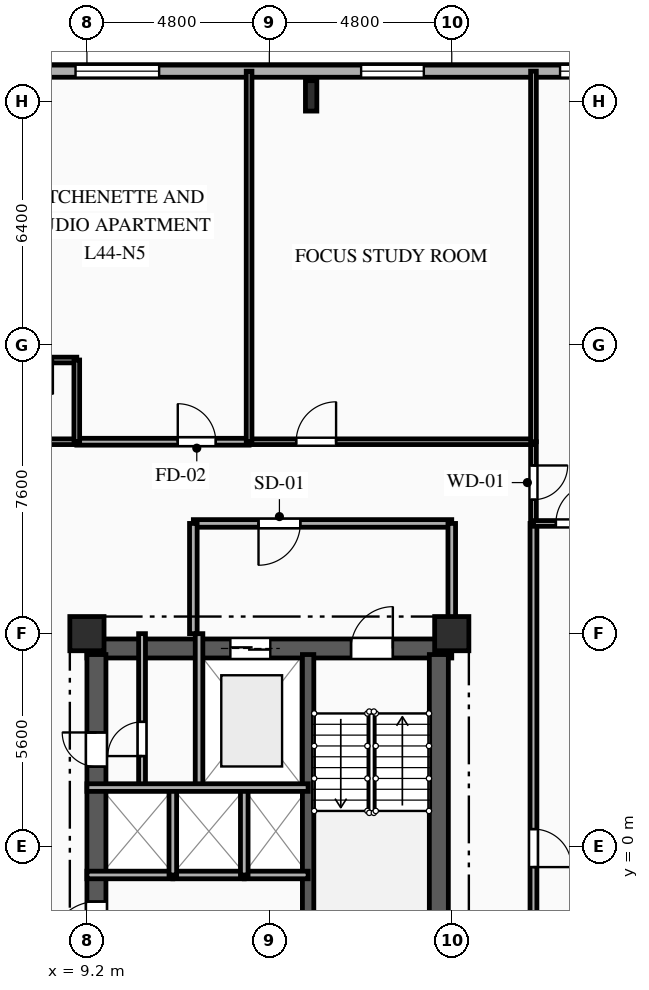
"""IFC4 building model, lengths in metres.
Left out: names, types, materials, properties, quantities, classifications, styles, units other than length and angle.
Written with IfcOpenShell. Run it as: python <this file> out.ifc"""

import sys

from ifc_helpers import new_model, si_unit, direction, frame, frame_2d, origin, origin_2d, place, context, subcontext, project, spatial, rectangle, i_section, extrude, element, fill, save


model = new_model("IFC4")
c1 = context("Model", 3, precision=1e-05, world=origin(), true_north=direction((0.0, 1.0)))
c2 = subcontext(c1, "Body", "Model", "MODEL_VIEW")
j1 = project(units=[si_unit("LENGTHUNIT", "METRE"), si_unit("PLANEANGLEUNIT", "RADIAN")], contexts=[c1])
p1 = place(None, origin())
s1 = spatial("IfcSite", under=j1, at=p1, CompositionType="ELEMENT")
p2 = place(p1, origin())
s2 = spatial("IfcBuilding", under=s1, at=p2, CompositionType="ELEMENT")
p3 = place(p2, frame((0.0, 0.0, 157.8)))
s3 = spatial("IfcBuildingStorey", under=s2, at=p3, CompositionType="ELEMENT", Elevation=157.8)
for number, where, z_axis, x_axis in (
    (1, (9.2, 5.6, 0.0), (0.0, 0.0, 1.0), (1.0, 0.0, 0.0)),
    (2, (18.8, 5.6, 0.0), (0.0, 0.0, 1.0), (1.0, 0.0, 0.0)),
):
    element("IfcColumn", number, at=place(p3, frame(where, z_axis=z_axis, x_axis=x_axis)), inside=s3, PredefinedType="COLUMN", context=c2, shape_type="SweptSolid", body=[
        extrude(rectangle(XDim=0.9, YDim=0.9, at=origin_2d()), origin(), (0.0, 0.0, 1.0), 3.35),
    ])
p4 = place(p3, frame((15.1, 19.75, 0.0), z_axis=(0.0, 0.0, 1.0), x_axis=(1.0, 0.0, 0.0)))
e3 = element("IfcColumn", 3, at=p4, inside=s3, PredefinedType="COLUMN", context=c2, shape_type="SweptSolid", body=[
    extrude(i_section(OverallWidth=0.3, OverallDepth=0.8, WebThickness=0.018, FlangeThickness=0.033, FilletRadius=0.03, at=origin_2d()), origin(), (0.0, 0.0, 1.0), 3.35),
])
p5 = place(p3, frame((-25.8, 20.4, 0.0), z_axis=(0.0, 0.0, 1.0), x_axis=(1.0, 0.0, 0.0)))
e4 = element("IfcWall", 4, at=p5, inside=s3, PredefinedType="SOLIDWALL", context=c2, shape_type="SweptSolid", body=[
    extrude(rectangle(XDim=49.6, YDim=0.32, at=frame_2d((24.8, 0.0))), origin(), (0.0, 0.0, 1.0), 3.04),
])
p6 = place(p5, frame((2.135, 0.0, 0.85)))
e5 = element("IfcOpeningElement", 5, at=p6, cuts=e4, PredefinedType="OPENING", context=c2, shape_type="SweptSolid", body=[
    extrude(rectangle(XDim=1.65, YDim=1.85, at=frame_2d((0.825, 0.925))), frame((0.0, 0.17, 0.0), z_axis=(0.0, -1.0, 0.0), x_axis=(1.0, 0.0, 0.0)), (0.0, 0.0, 1.0), 0.34),
])
p7 = place(p5, frame((6.706, 0.0, 0.85)))
e6 = element("IfcOpeningElement", 6, at=p7, cuts=e4, PredefinedType="OPENING", context=c2, shape_type="SweptSolid", body=[
    extrude(rectangle(XDim=1.65, YDim=1.85, at=frame_2d((0.825, 0.925))), frame((0.0, 0.17, 0.0), z_axis=(0.0, -1.0, 0.0), x_axis=(1.0, 0.0, 0.0)), (0.0, 0.0, 1.0), 0.34),
])
p8 = place(p5, frame((14.966, 0.0, 0.85)))
e7 = element("IfcOpeningElement", 7, at=p8, cuts=e4, PredefinedType="OPENING", context=c2, shape_type="SweptSolid", body=[
    extrude(rectangle(XDim=1.5, YDim=1.85, at=frame_2d((0.75, 0.925))), frame((0.0, 0.17, 0.0), z_axis=(0.0, -1.0, 0.0), x_axis=(1.0, 0.0, 0.0)), (0.0, 0.0, 1.0), 0.34),
])
p9 = place(p5, frame((20.74, 0.0, 0.85)))
e8 = element("IfcOpeningElement", 8, at=p9, cuts=e4, PredefinedType="OPENING", context=c2, shape_type="SweptSolid", body=[
    extrude(rectangle(XDim=2.2, YDim=1.85, at=frame_2d((1.1, 0.925))), frame((0.0, 0.17, 0.0), z_axis=(0.0, -1.0, 0.0), x_axis=(1.0, 0.0, 0.0)), (0.0, 0.0, 1.0), 0.34),
])
p10 = place(p5, frame((27.74, 0.0, 0.85)))
e9 = element("IfcOpeningElement", 9, at=p10, cuts=e4, PredefinedType="OPENING", context=c2, shape_type="SweptSolid", body=[
    extrude(rectangle(XDim=2.2, YDim=1.85, at=frame_2d((1.1, 0.925))), frame((0.0, 0.17, 0.0), z_axis=(0.0, -1.0, 0.0), x_axis=(1.0, 0.0, 0.0)), (0.0, 0.0, 1.0), 0.34),
])
p11 = place(p5, frame((34.7, 0.0, 0.85)))
e10 = element("IfcOpeningElement", 10, at=p11, cuts=e4, PredefinedType="OPENING", context=c2, shape_type="SweptSolid", body=[
    extrude(rectangle(XDim=2.2, YDim=1.85, at=frame_2d((1.1, 0.925))), frame((0.0, 0.17, 0.0), z_axis=(0.0, -1.0, 0.0), x_axis=(1.0, 0.0, 0.0)), (0.0, 0.0, 1.0), 0.34),
])
p12 = place(p5, frame((42.215, 0.0, 0.85)))
e11 = element("IfcOpeningElement", 11, at=p12, cuts=e4, PredefinedType="OPENING", context=c2, shape_type="SweptSolid", body=[
    extrude(rectangle(XDim=1.65, YDim=1.85, at=frame_2d((0.825, 0.925))), frame((0.0, 0.17, 0.0), z_axis=(0.0, -1.0, 0.0), x_axis=(1.0, 0.0, 0.0)), (0.0, 0.0, 1.0), 0.34),
])
p13 = place(p5, frame((47.45, 0.0, 0.85)))
e12 = element("IfcOpeningElement", 12, at=p13, cuts=e4, PredefinedType="OPENING", context=c2, shape_type="SweptSolid", body=[
    extrude(rectangle(XDim=1.1, YDim=1.85, at=frame_2d((0.55, 0.925))), frame((0.0, 0.17, 0.0), z_axis=(0.0, -1.0, 0.0), x_axis=(1.0, 0.0, 0.0)), (0.0, 0.0, 1.0), 0.34),
])
p14 = place(p3, frame((9.2, 5.21, 0.0), z_axis=(0.0, 0.0, 1.0), x_axis=(1.0, 0.0, 0.0)))
e13 = element("IfcWall", 13, at=p14, inside=s3, PredefinedType="SHEAR", context=c2, shape_type="SweptSolid", body=[
    extrude(rectangle(XDim=9.6, YDim=0.5, at=frame_2d((4.8, 0.0))), origin(), (0.0, 0.0, 1.0), 3.04),
])
p15 = place(p14, frame((6.95, 0.0, 0.0)))
e14 = element("IfcOpeningElement", 14, at=p15, cuts=e13, PredefinedType="OPENING", context=c2, shape_type="SweptSolid", body=[
    extrude(rectangle(XDim=1.1, YDim=2.15, at=frame_2d((0.55, 1.075))), frame((0.0, 0.26, 0.0), z_axis=(0.0, -1.0, 0.0), x_axis=(1.0, 0.0, 0.0)), (0.0, 0.0, 1.0), 0.52),
])
p16 = place(p14, frame((3.775, 0.0, 0.0)))
e15 = element("IfcOpeningElement", 15, at=p16, cuts=e13, PredefinedType="OPENING", context=c2, shape_type="SweptSolid", body=[
    extrude(rectangle(XDim=1.05, YDim=2.1, at=frame_2d((0.525, 1.05))), frame((0.0, 0.26, 0.0), z_axis=(0.0, -1.0, 0.0), x_axis=(1.0, 0.0, 0.0)), (0.0, 0.0, 1.0), 0.52),
])
p17 = place(p3, frame((9.45, -5.05, 0.0), z_axis=(0.0, 0.0, 1.0), x_axis=(0.0, 1.0, 0.0)))
e16 = element("IfcWall", 16, at=p17, inside=s3, PredefinedType="SHEAR", context=c2, shape_type="SweptSolid", body=[
    extrude(rectangle(XDim=10.1, YDim=0.5, at=frame_2d((5.05, 0.0))), origin(), (0.0, 0.0, 1.0), 3.04),
])
p18 = place(p17, frame((7.15, 0.0, 0.0)))
e17 = element("IfcOpeningElement", 17, at=p18, cuts=e16, PredefinedType="OPENING", context=c2, shape_type="SweptSolid", body=[
    extrude(rectangle(XDim=0.9, YDim=2.1, at=frame_2d((0.45, 1.05))), frame((0.0, 0.26, 0.0), z_axis=(0.0, -1.0, 0.0), x_axis=(1.0, 0.0, 0.0)), (0.0, 0.0, 1.0), 0.52),
])
p19 = place(p17, frame((2.4, 0.0, 0.0)))
e18 = element("IfcOpeningElement", 18, at=p19, cuts=e16, PredefinedType="OPENING", context=c2, shape_type="SweptSolid", body=[
    extrude(rectangle(XDim=1.2, YDim=2.15, at=frame_2d((0.6, 1.075))), frame((0.0, 0.26, 0.0), z_axis=(0.0, -1.0, 0.0), x_axis=(1.0, 0.0, 0.0)), (0.0, 0.0, 1.0), 0.52),
])
p20 = place(p3, frame((18.46, -5.05, 0.0), z_axis=(0.0, 0.0, 1.0), x_axis=(0.0, 1.0, 0.0)))
e19 = element("IfcWall", 19, at=p20, inside=s3, PredefinedType="SHEAR", context=c2, shape_type="SweptSolid", body=[
    extrude(rectangle(XDim=10.1, YDim=0.5, at=frame_2d((5.05, 0.0))), origin(), (0.0, 0.0, 1.0), 3.04),
])
p21 = place(p3, frame((15.02, -5.05, 0.0), z_axis=(0.0, 0.0, 1.0), x_axis=(0.0, 1.0, 0.0)))
e20 = element("IfcWall", 20, at=p21, inside=s3, PredefinedType="SHEAR", context=c2, shape_type="SweptSolid", body=[
    extrude(rectangle(XDim=10.1, YDim=0.3, at=frame_2d((5.05, 0.0))), origin(), (0.0, 0.0, 1.0), 3.04),
])
p22 = place(p3, frame((12.15, 5.6, 0.0), z_axis=(0.0, 0.0, 1.0), x_axis=(0.0, -1.0, 0.0)))
e21 = element("IfcWall", 21, at=p22, inside=s3, PredefinedType="PARTITIONING", context=c2, shape_type="SweptSolid", body=[
    extrude(rectangle(XDim=4.05, YDim=0.2, at=frame_2d((2.025, 0.0))), origin(), (0.0, 0.0, 1.0), 3.04),
])
p23 = place(p3, frame((18.8, 8.5, 0.0), z_axis=(0.0, 0.0, 1.0), x_axis=(-1.0, 0.0, 0.0)))
e22 = element("IfcWall", 22, at=p23, inside=s3, PredefinedType="PARTITIONING", context=c2, shape_type="SweptSolid", body=[
    extrude(rectangle(XDim=6.8, YDim=0.2, at=frame_2d((3.4, 0.0))), origin(), (0.0, 0.0, 1.0), 3.04),
])
p24 = place(p23, frame((3.985, 0.0, 0.0)))
e23 = element("IfcOpeningElement", 23, at=p24, cuts=e22, PredefinedType="OPENING", context=c2, shape_type="SweptSolid", body=[
    extrude(rectangle(XDim=1.1, YDim=2.15, at=frame_2d((0.55, 1.075))), frame((0.0, 0.11, 0.0), z_axis=(0.0, -1.0, 0.0), x_axis=(1.0, 0.0, 0.0)), (0.0, 0.0, 1.0), 0.22),
])
p25 = place(p3, frame((18.8, 5.6, 0.0), z_axis=(0.0, 0.0, 1.0), x_axis=(0.0, 1.0, 0.0)))
e24 = element("IfcWall", 24, at=p25, inside=s3, PredefinedType="PARTITIONING", context=c2, shape_type="SweptSolid", body=[
    extrude(rectangle(XDim=2.9, YDim=0.2, at=frame_2d((1.45, 0.0))), origin(), (0.0, 0.0, 1.0), 2.525),
])
p26 = place(p3, frame((12.0, 8.5, 0.0), z_axis=(0.0, 0.0, 1.0), x_axis=(0.0, -1.0, 0.0)))
e25 = element("IfcWall", 25, at=p26, inside=s3, PredefinedType="PARTITIONING", context=c2, shape_type="SweptSolid", body=[
    extrude(rectangle(XDim=2.9, YDim=0.2, at=frame_2d((1.45, 0.0))), origin(), (0.0, 0.0, 1.0), 3.04),
])
p27 = place(p3, frame((10.65, 1.55, 0.0), z_axis=(0.0, 0.0, 1.0), x_axis=(0.0, 1.0, 0.0)))
e26 = element("IfcWall", 26, at=p27, inside=s3, PredefinedType="PARTITIONING", context=c2, shape_type="SweptSolid", body=[
    extrude(rectangle(XDim=4.05, YDim=0.18, at=frame_2d((2.025, 0.0))), origin(), (0.0, 0.0, 1.0), 3.04),
])
p28 = place(p27, frame((0.829, 0.0, 0.0)))
e27 = element("IfcOpeningElement", 27, at=p28, cuts=e26, PredefinedType="OPENING", context=c2, shape_type="SweptSolid", body=[
    extrude(rectangle(XDim=0.9, YDim=2.1, at=frame_2d((0.45, 1.05))), frame((0.0, 0.1, 0.0), z_axis=(0.0, -1.0, 0.0), x_axis=(1.0, 0.0, 0.0)), (0.0, 0.0, 1.0), 0.2),
])
p29 = place(p3, frame((11.46, -0.75, 0.0), z_axis=(0.0, 0.0, 1.0), x_axis=(-1.0, 0.0, 0.0)))
e28 = element("IfcWall", 28, at=p29, inside=s3, PredefinedType="PARTITIONING", context=c2, shape_type="SweptSolid", body=[
    extrude(rectangle(XDim=2.26, YDim=0.2, at=frame_2d((1.13, 0.0))), origin(), (0.0, 0.0, 1.0), 3.04),
])
p30 = place(p3, frame((13.34, -0.75, 0.0), z_axis=(0.0, 0.0, 1.0), x_axis=(-1.0, 0.0, 0.0)))
e29 = element("IfcWall", 29, at=p30, inside=s3, PredefinedType="PARTITIONING", context=c2, shape_type="SweptSolid", body=[
    extrude(rectangle(XDim=1.88, YDim=0.2, at=frame_2d((0.94, 0.0))), origin(), (0.0, 0.0, 1.0), 3.04),
])
p31 = place(p3, frame((15.02, -0.75, 0.0), z_axis=(0.0, 0.0, 1.0), x_axis=(-1.0, 0.0, 0.0)))
e30 = element("IfcWall", 30, at=p31, inside=s3, PredefinedType="PARTITIONING", context=c2, shape_type="SweptSolid", body=[
    extrude(rectangle(XDim=1.68, YDim=0.2, at=frame_2d((0.84, 0.0))), origin(), (0.0, 0.0, 1.0), 3.04),
])
for number, where, z_axis, x_axis in (
    (31, (11.46, -0.75, 0.0), (0.0, 0.0, 1.0), (0.0, 1.0, 0.0)),
    (32, (13.34, -0.75, 0.0), (0.0, 0.0, 1.0), (0.0, 1.0, 0.0)),
):
    element("IfcWall", number, at=place(p3, frame(where, z_axis=z_axis, x_axis=x_axis)), inside=s3, PredefinedType="PARTITIONING", context=c2, shape_type="SweptSolid", body=[
        extrude(rectangle(XDim=2.3, YDim=0.2, at=frame_2d((1.15, 0.0))), origin(), (0.0, 0.0, 1.0), 3.04),
    ])
p32 = place(p3, frame((20.95, 10.65, 0.0), z_axis=(0.0, 0.0, 1.0), x_axis=(0.0, -1.0, 0.0)))
e33 = element("IfcWall", 33, at=p32, inside=s3, PredefinedType="PARTITIONING", context=c2, shape_type="SweptSolid", body=[
    extrude(rectangle(XDim=2.15, YDim=0.15, at=frame_2d((1.075, 0.0))), origin(), (0.0, 0.0, 1.0), 3.04),
])
p33 = place(p32, frame((0.625, 0.0, 0.0)))
e34 = element("IfcOpeningElement", 34, at=p33, cuts=e33, PredefinedType="OPENING", context=c2, shape_type="SweptSolid", body=[
    extrude(rectangle(XDim=0.9, YDim=2.1, at=frame_2d((0.45, 1.05))), frame((0.0, 0.085, 0.0), z_axis=(0.0, -1.0, 0.0), x_axis=(1.0, 0.0, 0.0)), (0.0, 0.0, 1.0), 0.17),
])
p34 = place(p3, frame((8.933, 10.65, 0.0), z_axis=(0.0, 0.0, 1.0), x_axis=(1.0, 0.0, 0.0)))
e35 = element("IfcWall", 35, at=p34, inside=s3, PredefinedType="PARTITIONING", context=c2, shape_type="SweptSolid", body=[
    extrude(rectangle(XDim=4.534, YDim=0.18, at=frame_2d((2.267, 0.0))), origin(), (0.0, 0.0, 1.0), 3.04),
])
p35 = place(p34, frame((2.657, 0.0, 0.0)))
e36 = element("IfcOpeningElement", 36, at=p35, cuts=e35, PredefinedType="OPENING", context=c2, shape_type="SweptSolid", body=[
    extrude(rectangle(XDim=1.0, YDim=2.15, at=frame_2d((0.5, 1.075))), frame((0.0, 0.1, 0.0), z_axis=(0.0, -1.0, 0.0), x_axis=(1.0, 0.0, 0.0)), (0.0, 0.0, 1.0), 0.2),
])
p36 = place(p3, frame((6.483, 10.65, 0.0), z_axis=(0.0, 0.0, 1.0), x_axis=(1.0, 0.0, 0.0)))
e37 = element("IfcWall", 37, at=p36, inside=s3, PredefinedType="PLUMBINGWALL", context=c2, shape_type="SweptSolid", body=[
    extrude(rectangle(XDim=2.45, YDim=0.15, at=frame_2d((1.225, 0.0))), origin(), (0.0, 0.0, 1.0), 3.04),
])
p37 = place(p3, frame((13.467, 10.65, 0.0), z_axis=(0.0, 0.0, 1.0), x_axis=(1.0, 0.0, 0.0)))
e38 = element("IfcWall", 38, at=p37, inside=s3, PredefinedType="PARTITIONING", context=c2, shape_type="SweptSolid", body=[
    extrude(rectangle(XDim=7.483, YDim=0.15, at=frame_2d((3.741, 0.0))), origin(), (0.0, 0.0, 1.0), 3.04),
])
p38 = place(p37, frame((1.239, 0.0, 0.0)))
e39 = element("IfcOpeningElement", 39, at=p38, cuts=e38, PredefinedType="OPENING", context=c2, shape_type="SweptSolid", body=[
    extrude(rectangle(XDim=1.05, YDim=2.15, at=frame_2d((0.525, 1.075))), frame((0.0, 0.085, 0.0), z_axis=(0.0, -1.0, 0.0), x_axis=(1.0, 0.0, 0.0)), (0.0, 0.0, 1.0), 0.17),
])
p39 = place(p3, frame((20.95, 8.5, 0.0), z_axis=(0.0, 0.0, 1.0), x_axis=(0.0, -1.0, 0.0)))
e40 = element("IfcWall", 40, at=p39, inside=s3, PredefinedType="PARTITIONING", context=c2, shape_type="SweptSolid", body=[
    extrude(rectangle(XDim=14.1, YDim=0.18, at=frame_2d((7.05, 0.0))), origin(), (0.0, 0.0, 1.0), 3.04),
])
p40 = place(p39, frame((8.042, 0.0, 0.0)))
e41 = element("IfcOpeningElement", 41, at=p40, cuts=e40, PredefinedType="OPENING", context=c2, shape_type="SweptSolid", body=[
    extrude(rectangle(XDim=1.0, YDim=2.15, at=frame_2d((0.5, 1.075))), frame((0.0, 0.1, 0.0), z_axis=(0.0, -1.0, 0.0), x_axis=(1.0, 0.0, 0.0)), (0.0, 0.0, 1.0), 0.2),
])
p41 = place(p3, frame((20.95, 8.5, 0.0), z_axis=(0.0, 0.0, 1.0), x_axis=(1.0, 0.0, 0.0)))
e42 = element("IfcWall", 42, at=p41, inside=s3, PredefinedType="PARTITIONING", context=c2, shape_type="SweptSolid", body=[
    extrude(rectangle(XDim=2.23, YDim=0.15, at=frame_2d((1.115, 0.0))), origin(), (0.0, 0.0, 1.0), 3.04),
])
p42 = place(p41, frame((0.59, 0.0, 0.0)))
e43 = element("IfcOpeningElement", 43, at=p42, cuts=e42, PredefinedType="OPENING", context=c2, shape_type="SweptSolid", body=[
    extrude(rectangle(XDim=1.05, YDim=2.15, at=frame_2d((0.525, 1.075))), frame((0.0, 0.085, 0.0), z_axis=(0.0, -1.0, 0.0), x_axis=(1.0, 0.0, 0.0)), (0.0, 0.0, 1.0), 0.17),
])
p43 = place(p3, frame((20.95, 10.65, 0.0), z_axis=(0.0, 0.0, 1.0), x_axis=(0.0, 1.0, 0.0)))
e44 = element("IfcWall", 44, at=p43, inside=s3, PredefinedType="PARTITIONING", context=c2, shape_type="SweptSolid", body=[
    extrude(rectangle(XDim=9.75, YDim=0.15, at=frame_2d((4.875, 0.0))), origin(), (0.0, 0.0, 1.0), 2.525),
])
p44 = place(p3, frame((8.933, 12.8, 0.0), z_axis=(0.0, 0.0, 1.0), x_axis=(-1.0, 0.0, 0.0)))
e45 = element("IfcWall", 45, at=p44, inside=s3, PredefinedType="PLUMBINGWALL", context=c2, shape_type="SweptSolid", body=[
    extrude(rectangle(XDim=2.45, YDim=0.15, at=frame_2d((1.225, 0.0))), origin(), (0.0, 0.0, 1.0), 3.04),
])
p45 = place(p44, frame((0.629, 0.0, 0.0)))
e46 = element("IfcOpeningElement", 46, at=p45, cuts=e45, PredefinedType="OPENING", context=c2, shape_type="SweptSolid", body=[
    extrude(rectangle(XDim=0.9, YDim=2.1, at=frame_2d((0.45, 1.05))), frame((0.0, 0.085, 0.0), z_axis=(0.0, -1.0, 0.0), x_axis=(1.0, 0.0, 0.0)), (0.0, 0.0, 1.0), 0.17),
])
p46 = place(p3, frame((8.933, 10.65, 0.0), z_axis=(0.0, 0.0, 1.0), x_axis=(0.0, 1.0, 0.0)))
e47 = element("IfcWall", 47, at=p46, inside=s3, PredefinedType="PLUMBINGWALL", context=c2, shape_type="SweptSolid", body=[
    extrude(rectangle(XDim=2.15, YDim=0.15, at=frame_2d((1.075, 0.0))), origin(), (0.0, 0.0, 1.0), 3.04),
])
p47 = place(p3, frame((13.467, 20.4, 0.0), z_axis=(0.0, 0.0, 1.0), x_axis=(0.0, -1.0, 0.0)))
e48 = element("IfcWall", 48, at=p47, inside=s3, PredefinedType="PARTITIONING", context=c2, shape_type="SweptSolid", body=[
    extrude(rectangle(XDim=9.75, YDim=0.15, at=frame_2d((4.875, 0.0))), origin(), (0.0, 0.0, 1.0), 3.04),
])
p48 = place(p3, frame((9.2, 1.55, 0.0), z_axis=(0.0, 0.0, 1.0), x_axis=(1.0, 0.0, 0.0)))
e49 = element("IfcWall", 49, at=p48, inside=s3, PredefinedType="PARTITIONING", context=c2, shape_type="SweptSolid", body=[
    extrude(rectangle(XDim=5.82, YDim=0.2, at=frame_2d((2.91, 0.0))), origin(), (0.0, 0.0, 1.0), 3.04),
])
p49 = place(p11, origin())
e50 = element("IfcWindow", 50, at=p49, inside=s3, PartitioningType="SINGLE_PANEL", PredefinedType="WINDOW", context=c2, shape_type="SweptSolid", body=[
    extrude(rectangle(XDim=2.2, YDim=1.85, at=frame_2d((1.1, 0.925))), frame((0.0, 0.03, 0.0), z_axis=(0.0, -1.0, 0.0), x_axis=(1.0, 0.0, 0.0)), (0.0, 0.0, 1.0), 0.06),
])
fill(e10, e50)
p50 = place(p12, origin())
e51 = element("IfcWindow", 51, at=p50, inside=s3, PartitioningType="SINGLE_PANEL", PredefinedType="WINDOW", context=c2, shape_type="SweptSolid", body=[
    extrude(rectangle(XDim=1.65, YDim=1.85, at=frame_2d((0.825, 0.925))), frame((0.0, 0.03, 0.0), z_axis=(0.0, -1.0, 0.0), x_axis=(1.0, 0.0, 0.0)), (0.0, 0.0, 1.0), 0.06),
])
fill(e11, e51)
p51 = place(p13, origin())
e52 = element("IfcWindow", 52, at=p51, inside=s3, PartitioningType="SINGLE_PANEL", PredefinedType="WINDOW", context=c2, shape_type="SweptSolid", body=[
    extrude(rectangle(XDim=1.1, YDim=1.85, at=frame_2d((0.55, 0.925))), frame((0.0, 0.03, 0.0), z_axis=(0.0, -1.0, 0.0), x_axis=(1.0, 0.0, 0.0)), (0.0, 0.0, 1.0), 0.06),
])
fill(e12, e52)
p52 = place(p15, origin())
e53 = element("IfcDoor", 53, at=p52, inside=s3, OperationType="SINGLE_SWING_RIGHT", PredefinedType="DOOR", context=c2, shape_type="SweptSolid", body=[
    extrude(rectangle(XDim=1.1, YDim=2.15, at=frame_2d((0.55, 1.075))), frame((0.0, 0.025, 0.0), z_axis=(0.0, -1.0, 0.0), x_axis=(1.0, 0.0, 0.0)), (0.0, 0.0, 1.0), 0.05),
])
fill(e14, e53)
p53 = place(p16, origin())
e54 = element("IfcDoor", 54, at=p53, inside=s3, OperationType="DOUBLE_DOOR_SLIDING", PredefinedType="DOOR", context=c2, shape_type="SweptSolid", body=[
    extrude(rectangle(XDim=1.05, YDim=2.1, at=frame_2d((0.525, 1.05))), frame((0.0, 0.025, 0.0), z_axis=(0.0, -1.0, 0.0), x_axis=(1.0, 0.0, 0.0)), (0.0, 0.0, 1.0), 0.05),
])
fill(e15, e54)
p54 = place(p24, origin())
e55 = element("IfcDoor", 55, at=p54, inside=s3, OperationType="SINGLE_SWING_RIGHT", PredefinedType="DOOR", context=c2, shape_type="SweptSolid", body=[
    extrude(rectangle(XDim=1.1, YDim=2.15, at=frame_2d((0.55, 1.075))), frame((0.0, 0.025, 0.0), z_axis=(0.0, -1.0, 0.0), x_axis=(1.0, 0.0, 0.0)), (0.0, 0.0, 1.0), 0.05),
])
fill(e23, e55)
p55 = place(p28, origin())
e56 = element("IfcDoor", 56, at=p55, inside=s3, OperationType="SINGLE_SWING_LEFT", PredefinedType="DOOR", context=c2, shape_type="SweptSolid", body=[
    extrude(rectangle(XDim=0.9, YDim=2.1, at=frame_2d((0.45, 1.05))), frame((0.0, 0.025, 0.0), z_axis=(0.0, -1.0, 0.0), x_axis=(1.0, 0.0, 0.0)), (0.0, 0.0, 1.0), 0.05),
])
fill(e27, e56)
p56 = place(p18, origin())
e57 = element("IfcDoor", 57, at=p56, inside=s3, OperationType="SINGLE_SWING_RIGHT", PredefinedType="DOOR", context=c2, shape_type="SweptSolid", body=[
    extrude(rectangle(XDim=0.9, YDim=2.1, at=frame_2d((0.45, 1.05))), frame((0.0, 0.025, 0.0), z_axis=(0.0, -1.0, 0.0), x_axis=(1.0, 0.0, 0.0)), (0.0, 0.0, 1.0), 0.05),
])
fill(e17, e57)
p57 = place(p19, origin())
e58 = element("IfcDoor", 58, at=p57, inside=s3, OperationType="SINGLE_SWING_LEFT", PredefinedType="DOOR", context=c2, shape_type="SweptSolid", body=[
    extrude(rectangle(XDim=1.2, YDim=2.15, at=frame_2d((0.6, 1.075))), frame((0.0, 0.025, 0.0), z_axis=(0.0, -1.0, 0.0), x_axis=(1.0, 0.0, 0.0)), (0.0, 0.0, 1.0), 0.05),
])
fill(e18, e58)
p58 = place(p33, origin())
e59 = element("IfcDoor", 59, at=p58, inside=s3, OperationType="SINGLE_SWING_LEFT", PredefinedType="DOOR", context=c2, shape_type="SweptSolid", body=[
    extrude(rectangle(XDim=0.9, YDim=2.1, at=frame_2d((0.45, 1.05))), frame((0.0, 0.025, 0.0), z_axis=(0.0, -1.0, 0.0), x_axis=(1.0, 0.0, 0.0)), (0.0, 0.0, 1.0), 0.05),
])
fill(e34, e59)
p59 = place(p35, origin())
e60 = element("IfcDoor", 60, at=p59, inside=s3, OperationType="SINGLE_SWING_LEFT", PredefinedType="DOOR", context=c2, shape_type="SweptSolid", body=[
    extrude(rectangle(XDim=1.0, YDim=2.15, at=frame_2d((0.5, 1.075))), frame((0.0, 0.025, 0.0), z_axis=(0.0, -1.0, 0.0), x_axis=(1.0, 0.0, 0.0)), (0.0, 0.0, 1.0), 0.05),
])
fill(e36, e60)
p60 = place(p38, origin())
e61 = element("IfcDoor", 61, at=p60, inside=s3, OperationType="SINGLE_SWING_RIGHT", PredefinedType="DOOR", context=c2, shape_type="SweptSolid", body=[
    extrude(rectangle(XDim=1.05, YDim=2.15, at=frame_2d((0.525, 1.075))), frame((0.0, 0.025, 0.0), z_axis=(0.0, -1.0, 0.0), x_axis=(1.0, 0.0, 0.0)), (0.0, 0.0, 1.0), 0.05),
])
fill(e39, e61)
p61 = place(p40, origin())
e62 = element("IfcDoor", 62, at=p61, inside=s3, OperationType="SINGLE_SWING_RIGHT", PredefinedType="DOOR", context=c2, shape_type="SweptSolid", body=[
    extrude(rectangle(XDim=1.0, YDim=2.15, at=frame_2d((0.5, 1.075))), frame((0.0, 0.025, 0.0), z_axis=(0.0, -1.0, 0.0), x_axis=(1.0, 0.0, 0.0)), (0.0, 0.0, 1.0), 0.05),
])
fill(e41, e62)
p62 = place(p42, origin())
e63 = element("IfcDoor", 63, at=p62, inside=s3, OperationType="SINGLE_SWING_RIGHT", PredefinedType="DOOR", context=c2, shape_type="SweptSolid", body=[
    extrude(rectangle(XDim=1.05, YDim=2.15, at=frame_2d((0.525, 1.075))), frame((0.0, 0.025, 0.0), z_axis=(0.0, -1.0, 0.0), x_axis=(1.0, 0.0, 0.0)), (0.0, 0.0, 1.0), 0.05),
])
fill(e43, e63)
p63 = place(p45, origin())
e64 = element("IfcDoor", 64, at=p63, inside=s3, OperationType="SINGLE_SWING_LEFT", PredefinedType="DOOR", context=c2, shape_type="SweptSolid", body=[
    extrude(rectangle(XDim=0.9, YDim=2.1, at=frame_2d((0.45, 1.05))), frame((0.0, 0.025, 0.0), z_axis=(0.0, -1.0, 0.0), x_axis=(1.0, 0.0, 0.0)), (0.0, 0.0, 1.0), 0.05),
])
fill(e46, e64)
save(model, sys.argv[1])
